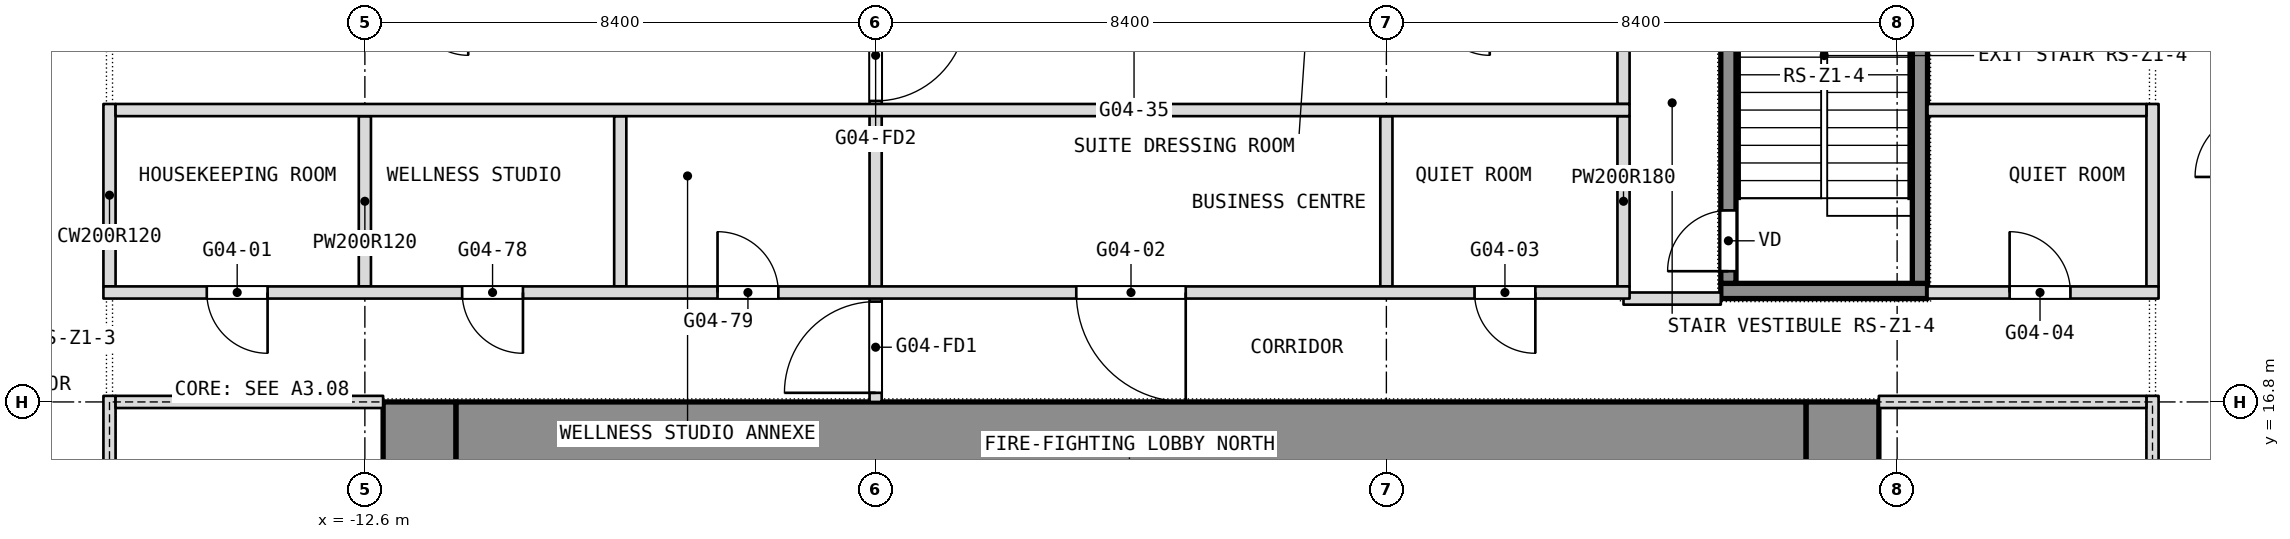
"""IFC4 building model, lengths in metres.
Left out: names, types, materials, properties, quantities, classifications, styles, units other than length and angle.
Written with IfcOpenShell. Run it as: python <this file> out.ifc"""

import sys

from ifc_helpers import new_model, si_unit, direction, frame, frame_2d, origin, place, context, subcontext, project, spatial, rectangle, extrude, element, fill, save


model = new_model("IFC4")
c1 = context("Model", 3, precision=1e-05, world=origin(), true_north=direction((0.0, 1.0)))
c2 = subcontext(c1, "Body", "Model", "MODEL_VIEW")
j1 = project(units=[si_unit("LENGTHUNIT", "METRE"), si_unit("PLANEANGLEUNIT", "RADIAN")], contexts=[c1])
p1 = place(None, origin())
s1 = spatial("IfcSite", under=j1, at=p1, CompositionType="ELEMENT")
p2 = place(p1, origin())
s2 = spatial("IfcBuilding", under=s1, at=p2, CompositionType="ELEMENT")
p3 = place(p2, frame((0.0, 0.0, 58.1)))
s3 = spatial("IfcBuildingStorey", under=s2, at=p3, CompositionType="ELEMENT", Elevation=58.1)
p4 = place(p3, frame((11.7, 0.0, 0.0), z_axis=(0.0, 0.0, 1.0), x_axis=(0.0, 1.0, 0.0)))
e1 = element("IfcWall", 1, at=p4, inside=s3, PredefinedType="SHEAR", context=c2, shape_type="SweptSolid", body=[
    extrude(rectangle(XDim=16.8, YDim=1.2, at=frame_2d((8.4, 0.0))), origin(), (0.0, 0.0, 1.0), 3.6),
])
p5 = place(p4, frame((1.762, 0.0, 0.0)))
e2 = element("IfcOpeningElement", 2, at=p5, cuts=e1, PredefinedType="OPENING", context=c2, shape_type="SweptSolid", body=[
    extrude(rectangle(XDim=0.9, YDim=2.1, at=frame_2d((0.45, 1.05))), frame((0.0, 0.6, 0.0), z_axis=(0.0, -1.0, 0.0), x_axis=(1.0, 0.0, 0.0)), (0.0, 0.0, 1.0), 1.2),
])
p6 = place(p4, frame((4.387, 0.0, 0.0)))
e3 = element("IfcOpeningElement", 3, at=p6, cuts=e1, PredefinedType="OPENING", context=c2, shape_type="SweptSolid", body=[
    extrude(rectangle(XDim=0.9, YDim=2.1, at=frame_2d((0.45, 1.05))), frame((0.0, 0.6, 0.0), z_axis=(0.0, -1.0, 0.0), x_axis=(1.0, 0.0, 0.0)), (0.0, 0.0, 1.0), 1.2),
])
p7 = place(p4, frame((6.825, 0.0, 0.0)))
e4 = element("IfcOpeningElement", 4, at=p7, cuts=e1, PredefinedType="OPENING", context=c2, shape_type="SweptSolid", body=[
    extrude(rectangle(XDim=1.2, YDim=2.1, at=frame_2d((0.6, 1.05))), frame((0.0, 0.6, 0.0), z_axis=(0.0, -1.0, 0.0), x_axis=(1.0, 0.0, 0.0)), (0.0, 0.0, 1.0), 1.2),
])
p8 = place(p4, frame((14.137, 0.0, 0.0)))
e5 = element("IfcOpeningElement", 5, at=p8, cuts=e1, PredefinedType="OPENING", context=c2, shape_type="SweptSolid", body=[
    extrude(rectangle(XDim=0.9, YDim=2.1, at=frame_2d((0.45, 1.05))), frame((0.0, 0.6, 0.0), z_axis=(0.0, -1.0, 0.0), x_axis=(1.0, 0.0, 0.0)), (0.0, 0.0, 1.0), 1.2),
])
p9 = place(p4, frame((11.512, 0.0, 0.0)))
e6 = element("IfcOpeningElement", 6, at=p9, cuts=e1, PredefinedType="OPENING", context=c2, shape_type="SweptSolid", body=[
    extrude(rectangle(XDim=0.9, YDim=2.1, at=frame_2d((0.45, 1.05))), frame((0.0, 0.6, 0.0), z_axis=(0.0, -1.0, 0.0), x_axis=(1.0, 0.0, 0.0)), (0.0, 0.0, 1.0), 1.2),
])
p10 = place(p4, frame((8.775, 0.0, 0.0)))
e7 = element("IfcOpeningElement", 7, at=p10, cuts=e1, PredefinedType="OPENING", context=c2, shape_type="SweptSolid", body=[
    extrude(rectangle(XDim=1.2, YDim=2.1, at=frame_2d((0.6, 1.05))), frame((0.0, 0.6, 0.0), z_axis=(0.0, -1.0, 0.0), x_axis=(1.0, 0.0, 0.0)), (0.0, 0.0, 1.0), 1.2),
])
p11 = place(p3, frame((-11.7, 0.0, 0.0), z_axis=(0.0, 0.0, 1.0), x_axis=(0.0, 1.0, 0.0)))
e8 = element("IfcWall", 8, at=p11, inside=s3, PredefinedType="SHEAR", context=c2, shape_type="SweptSolid", body=[
    extrude(rectangle(XDim=16.8, YDim=1.2, at=frame_2d((8.4, 0.0))), origin(), (0.0, 0.0, 1.0), 3.6),
])
p12 = place(p11, frame((2.3, 0.0, 0.0)))
e9 = element("IfcOpeningElement", 9, at=p12, cuts=e8, PredefinedType="OPENING", context=c2, shape_type="SweptSolid", body=[
    extrude(rectangle(XDim=1.1, YDim=2.1, at=frame_2d((0.55, 1.05))), frame((0.0, 0.6, 0.0), z_axis=(0.0, -1.0, 0.0), x_axis=(1.0, 0.0, 0.0)), (0.0, 0.0, 1.0), 1.2),
])
p13 = place(p11, frame((4.85, 0.0, 0.0)))
e10 = element("IfcOpeningElement", 10, at=p13, cuts=e8, PredefinedType="OPENING", context=c2, shape_type="SweptSolid", body=[
    extrude(rectangle(XDim=1.1, YDim=2.1, at=frame_2d((0.55, 1.05))), frame((0.0, 0.6, 0.0), z_axis=(0.0, -1.0, 0.0), x_axis=(1.0, 0.0, 0.0)), (0.0, 0.0, 1.0), 1.2),
])
p14 = place(p11, frame((6.825, 0.0, 0.0)))
e11 = element("IfcOpeningElement", 11, at=p14, cuts=e8, PredefinedType="OPENING", context=c2, shape_type="SweptSolid", body=[
    extrude(rectangle(XDim=1.2, YDim=2.1, at=frame_2d((0.6, 1.05))), frame((0.0, 0.6, 0.0), z_axis=(0.0, -1.0, 0.0), x_axis=(1.0, 0.0, 0.0)), (0.0, 0.0, 1.0), 1.2),
])
p15 = place(p11, frame((13.4, 0.0, 0.0)))
e12 = element("IfcOpeningElement", 12, at=p15, cuts=e8, PredefinedType="OPENING", context=c2, shape_type="SweptSolid", body=[
    extrude(rectangle(XDim=1.1, YDim=2.1, at=frame_2d((0.55, 1.05))), frame((0.0, 0.6, 0.0), z_axis=(0.0, -1.0, 0.0), x_axis=(1.0, 0.0, 0.0)), (0.0, 0.0, 1.0), 1.2),
])
p16 = place(p11, frame((10.85, 0.0, 0.0)))
e13 = element("IfcOpeningElement", 13, at=p16, cuts=e8, PredefinedType="OPENING", context=c2, shape_type="SweptSolid", body=[
    extrude(rectangle(XDim=1.1, YDim=2.1, at=frame_2d((0.55, 1.05))), frame((0.0, 0.6, 0.0), z_axis=(0.0, -1.0, 0.0), x_axis=(1.0, 0.0, 0.0)), (0.0, 0.0, 1.0), 1.2),
])
p17 = place(p11, frame((8.775, 0.0, 0.0)))
e14 = element("IfcOpeningElement", 14, at=p17, cuts=e8, PredefinedType="OPENING", context=c2, shape_type="SweptSolid", body=[
    extrude(rectangle(XDim=1.2, YDim=2.1, at=frame_2d((0.6, 1.05))), frame((0.0, 0.6, 0.0), z_axis=(0.0, -1.0, 0.0), x_axis=(1.0, 0.0, 0.0)), (0.0, 0.0, 1.0), 1.2),
])
p18 = place(p3, frame((-11.1, 16.2, 0.0), z_axis=(0.0, 0.0, 1.0), x_axis=(1.0, 0.0, 0.0)))
e15 = element("IfcWall", 15, at=p18, inside=s3, PredefinedType="SHEAR", context=c2, shape_type="SweptSolid", body=[
    extrude(rectangle(XDim=22.2, YDim=1.2, at=frame_2d((11.1, 0.0))), origin(), (0.0, 0.0, 1.0), 3.6),
])
p19 = place(p3, frame((16.8, 18.7, 0.0), z_axis=(0.0, 0.0, 1.0), x_axis=(0.0, 1.0, 0.0)))
e16 = element("IfcWall", 16, at=p19, inside=s3, PredefinedType="PARTITIONING", context=c2, shape_type="SweptSolid", body=[
    extrude(rectangle(XDim=3.0, YDim=0.2, at=frame_2d((1.5, 0.0))), origin(), (0.0, 0.0, 1.0), 3.34),
])
p20 = place(p3, frame((8.1, 18.7, 0.0), z_axis=(0.0, 0.0, 1.0), x_axis=(0.0, 1.0, 0.0)))
e17 = element("IfcWall", 17, at=p20, inside=s3, PredefinedType="PARTITIONING", context=c2, shape_type="SweptSolid", body=[
    extrude(rectangle(XDim=2.8, YDim=0.2, at=frame_2d((1.4, 0.0))), origin(), (0.0, 0.0, 1.0), 3.34),
])
p21 = place(p3, frame((8.1, 21.7, 0.0), z_axis=(0.0, 0.0, 1.0), x_axis=(0.0, 1.0, 0.0)))
e18 = element("IfcWall", 18, at=p21, inside=s3, PredefinedType="PARTITIONING", context=c2, shape_type="SweptSolid", body=[
    extrude(rectangle(XDim=2.9, YDim=0.2, at=frame_2d((1.45, 0.0))), origin(), (0.0, 0.0, 1.0), 3.34),
])
p22 = place(p21, frame((1.85, 0.0, 0.0)))
e19 = element("IfcOpeningElement", 19, at=p22, cuts=e18, PredefinedType="OPENING", context=c2, shape_type="SweptSolid", body=[
    extrude(rectangle(XDim=0.9, YDim=2.1, at=frame_2d((0.45, 1.05))), frame((0.0, 0.1, 0.0), z_axis=(0.0, -1.0, 0.0), x_axis=(1.0, 0.0, 0.0)), (0.0, 0.0, 1.0), 0.2),
])
p23 = place(p3, frame((4.2, 18.7, 0.0), z_axis=(0.0, 0.0, 1.0), x_axis=(0.0, 1.0, 0.0)))
e20 = element("IfcWall", 20, at=p23, inside=s3, PredefinedType="PARTITIONING", context=c2, shape_type="SweptSolid", body=[
    extrude(rectangle(XDim=2.8, YDim=0.2, at=frame_2d((1.4, 0.0))), origin(), (0.0, 0.0, 1.0), 3.34),
])
p24 = place(p3, frame((-4.2, 16.8, 0.0), z_axis=(0.0, 0.0, 1.0), x_axis=(0.0, 1.0, 0.0)))
e21 = element("IfcWall", 21, at=p24, inside=s3, PredefinedType="PARTITIONING", context=c2, shape_type="SweptSolid", body=[
    extrude(rectangle(XDim=6.7, YDim=0.2, at=frame_2d((3.35, 0.0))), origin(), (0.0, 0.0, 1.0), 3.34),
])
p25 = place(p24, frame((0.15, 0.0, 0.0)))
e22 = element("IfcOpeningElement", 22, at=p25, cuts=e21, PredefinedType="OPENING", context=c2, shape_type="SweptSolid", body=[
    extrude(rectangle(XDim=1.5, YDim=2.1, at=frame_2d((0.75, 1.05))), frame((0.0, 0.1, 0.0), z_axis=(0.0, -1.0, 0.0), x_axis=(1.0, 0.0, 0.0)), (0.0, 0.0, 1.0), 0.2),
])
p26 = place(p24, frame((4.95, 0.0, 0.0)))
e23 = element("IfcOpeningElement", 23, at=p26, cuts=e21, PredefinedType="OPENING", context=c2, shape_type="SweptSolid", body=[
    extrude(rectangle(XDim=1.5, YDim=2.1, at=frame_2d((0.75, 1.05))), frame((0.0, 0.1, 0.0), z_axis=(0.0, -1.0, 0.0), x_axis=(1.0, 0.0, 0.0)), (0.0, 0.0, 1.0), 0.2),
])
for number, where, z_axis, x_axis in (
    (24, (-8.4, 18.7, 0.0), (0.0, 0.0, 1.0), (0.0, 1.0, 0.0)),
    (25, (-12.6, 18.7, 0.0), (0.0, 0.0, 1.0), (0.0, 1.0, 0.0)),
):
    element("IfcWall", number, at=place(p3, frame(where, z_axis=z_axis, x_axis=x_axis)), inside=s3, PredefinedType="PARTITIONING", context=c2, shape_type="SweptSolid", body=[
        extrude(rectangle(XDim=2.8, YDim=0.2, at=frame_2d((1.4, 0.0))), origin(), (0.0, 0.0, 1.0), 3.34),
    ])
p27 = place(p3, frame((-16.8, 18.7, 0.0), z_axis=(0.0, 0.0, 1.0), x_axis=(0.0, 1.0, 0.0)))
e26 = element("IfcWall", 26, at=p27, inside=s3, PredefinedType="PARTITIONING", context=c2, shape_type="SweptSolid", body=[
    extrude(rectangle(XDim=3.0, YDim=0.2, at=frame_2d((1.5, 0.0))), origin(), (0.0, 0.0, 1.0), 3.34),
])
p28 = place(p3, frame((8.1, 18.5, 0.0), z_axis=(0.0, 0.0, 1.0), x_axis=(1.0, 0.0, 0.0)))
e27 = element("IfcWall", 27, at=p28, inside=s3, PredefinedType="PARTITIONING", context=c2, shape_type="SweptSolid", body=[
    extrude(rectangle(XDim=1.6, YDim=0.2, at=frame_2d((0.8, 0.0))), origin(), (0.0, 0.0, 1.0), 3.34),
])
p29 = place(p3, frame((-16.9, 18.6, 0.0), z_axis=(0.0, 0.0, 1.0), x_axis=(1.0, 0.0, 0.0)))
e28 = element("IfcWall", 28, at=p29, inside=s3, PredefinedType="PARTITIONING", context=c2, shape_type="SweptSolid", body=[
    extrude(rectangle(XDim=25.1, YDim=0.2, at=frame_2d((12.55, 0.0))), origin(), (0.0, 0.0, 1.0), 3.34),
])
p30 = place(p29, frame((1.7, 0.0, 0.0)))
e29 = element("IfcOpeningElement", 29, at=p30, cuts=e28, PredefinedType="OPENING", context=c2, shape_type="SweptSolid", body=[
    extrude(rectangle(XDim=1.0, YDim=2.1, at=frame_2d((0.5, 1.05))), frame((0.0, 0.1, 0.0), z_axis=(0.0, -1.0, 0.0), x_axis=(1.0, 0.0, 0.0)), (0.0, 0.0, 1.0), 0.2),
])
p31 = place(p29, frame((16.0, 0.0, 0.0)))
e30 = element("IfcOpeningElement", 30, at=p31, cuts=e28, PredefinedType="OPENING", context=c2, shape_type="SweptSolid", body=[
    extrude(rectangle(XDim=1.8, YDim=2.1, at=frame_2d((0.9, 1.05))), frame((0.0, 0.1, 0.0), z_axis=(0.0, -1.0, 0.0), x_axis=(1.0, 0.0, 0.0)), (0.0, 0.0, 1.0), 0.2),
])
p32 = place(p29, frame((22.55, 0.0, 0.0)))
e31 = element("IfcOpeningElement", 31, at=p32, cuts=e28, PredefinedType="OPENING", context=c2, shape_type="SweptSolid", body=[
    extrude(rectangle(XDim=1.0, YDim=2.1, at=frame_2d((0.5, 1.05))), frame((0.0, 0.1, 0.0), z_axis=(0.0, -1.0, 0.0), x_axis=(1.0, 0.0, 0.0)), (0.0, 0.0, 1.0), 0.2),
])
p33 = place(p29, frame((5.9, 0.0, 0.0)))
e32 = element("IfcOpeningElement", 32, at=p33, cuts=e28, PredefinedType="OPENING", context=c2, shape_type="SweptSolid", body=[
    extrude(rectangle(XDim=1.0, YDim=2.1, at=frame_2d((0.5, 1.05))), frame((0.0, 0.1, 0.0), z_axis=(0.0, -1.0, 0.0), x_axis=(1.0, 0.0, 0.0)), (0.0, 0.0, 1.0), 0.2),
])
p34 = place(p29, frame((10.1, 0.0, 0.0)))
e33 = element("IfcOpeningElement", 33, at=p34, cuts=e28, PredefinedType="OPENING", context=c2, shape_type="SweptSolid", body=[
    extrude(rectangle(XDim=1.0, YDim=2.1, at=frame_2d((0.5, 1.05))), frame((0.0, 0.1, 0.0), z_axis=(0.0, -1.0, 0.0), x_axis=(1.0, 0.0, 0.0)), (0.0, 0.0, 1.0), 0.2),
])
p35 = place(p3, frame((13.1, 18.6, 0.0), z_axis=(0.0, 0.0, 1.0), x_axis=(1.0, 0.0, 0.0)))
e34 = element("IfcWall", 34, at=p35, inside=s3, PredefinedType="PARTITIONING", context=c2, shape_type="SweptSolid", body=[
    extrude(rectangle(XDim=3.8, YDim=0.2, at=frame_2d((1.9, 0.0))), origin(), (0.0, 0.0, 1.0), 3.34),
])
p36 = place(p35, frame((1.35, 0.0, 0.0)))
e35 = element("IfcOpeningElement", 35, at=p36, cuts=e34, PredefinedType="OPENING", context=c2, shape_type="SweptSolid", body=[
    extrude(rectangle(XDim=1.0, YDim=2.1, at=frame_2d((0.5, 1.05))), frame((0.0, 0.1, 0.0), z_axis=(0.0, -1.0, 0.0), x_axis=(1.0, 0.0, 0.0)), (0.0, 0.0, 1.0), 0.2),
])
p37 = place(p3, frame((-16.7, 21.6, 0.0), z_axis=(0.0, 0.0, 1.0), x_axis=(1.0, 0.0, 0.0)))
e36 = element("IfcWall", 36, at=p37, inside=s3, PredefinedType="PARTITIONING", context=c2, shape_type="SweptSolid", body=[
    extrude(rectangle(XDim=24.9, YDim=0.2, at=frame_2d((12.45, 0.0))), origin(), (0.0, 0.0, 1.0), 3.34),
])
p38 = place(p3, frame((13.1, 21.6, 0.0), z_axis=(0.0, 0.0, 1.0), x_axis=(1.0, 0.0, 0.0)))
e37 = element("IfcWall", 37, at=p38, inside=s3, PredefinedType="PARTITIONING", context=c2, shape_type="SweptSolid", body=[
    extrude(rectangle(XDim=3.6, YDim=0.2, at=frame_2d((1.8, 0.0))), origin(), (0.0, 0.0, 1.0), 3.34),
])
p39 = place(p3, frame((-16.8, -0.1, 0.0), z_axis=(0.0, 0.0, 1.0), x_axis=(0.0, 1.0, 0.0)))
e38 = element("IfcWall", 38, at=p39, inside=s3, PredefinedType="PARTITIONING", context=c2, shape_type="SweptSolid", body=[
    extrude(rectangle(XDim=17.0, YDim=0.2, at=frame_2d((8.5, 0.0))), origin(), (0.0, 0.0, 1.0), 3.34),
])
p40 = place(p39, frame((2.2, 0.0, 0.0)))
e39 = element("IfcOpeningElement", 39, at=p40, cuts=e38, PredefinedType="OPENING", context=c2, shape_type="SweptSolid", body=[
    extrude(rectangle(XDim=1.8, YDim=2.1, at=frame_2d((0.9, 1.05))), frame((0.0, 0.1, 0.0), z_axis=(0.0, -1.0, 0.0), x_axis=(1.0, 0.0, 0.0)), (0.0, 0.0, 1.0), 0.2),
])
p41 = place(p39, frame((7.2, 0.0, 0.0)))
e40 = element("IfcOpeningElement", 40, at=p41, cuts=e38, PredefinedType="OPENING", context=c2, shape_type="SweptSolid", body=[
    extrude(rectangle(XDim=1.8, YDim=2.1, at=frame_2d((0.9, 1.05))), frame((0.0, 0.1, 0.0), z_axis=(0.0, -1.0, 0.0), x_axis=(1.0, 0.0, 0.0)), (0.0, 0.0, 1.0), 0.2),
])
p42 = place(p3, frame((-16.7, 16.8, 0.0), z_axis=(0.0, 0.0, 1.0), x_axis=(1.0, 0.0, 0.0)))
e41 = element("IfcWall", 41, at=p42, inside=s3, PredefinedType="PARTITIONING", context=c2, shape_type="SweptSolid", body=[
    extrude(rectangle(XDim=4.4, YDim=0.2, at=frame_2d((2.2, 0.0))), origin(), (0.0, 0.0, 1.0), 2.84),
])
p43 = place(p3, frame((16.8, -0.1, 0.0), z_axis=(0.0, 0.0, 1.0), x_axis=(0.0, 1.0, 0.0)))
e42 = element("IfcWall", 42, at=p43, inside=s3, PredefinedType="PARTITIONING", context=c2, shape_type="SweptSolid", body=[
    extrude(rectangle(XDim=17.0, YDim=0.2, at=frame_2d((8.5, 0.0))), origin(), (0.0, 0.0, 1.0), 3.34),
])
p44 = place(p43, frame((2.2, 0.0, 0.0)))
e43 = element("IfcOpeningElement", 43, at=p44, cuts=e42, PredefinedType="OPENING", context=c2, shape_type="SweptSolid", body=[
    extrude(rectangle(XDim=1.8, YDim=2.1, at=frame_2d((0.9, 1.05))), frame((0.0, 0.1, 0.0), z_axis=(0.0, -1.0, 0.0), x_axis=(1.0, 0.0, 0.0)), (0.0, 0.0, 1.0), 0.2),
])
p45 = place(p43, frame((13.0, 0.0, 0.0)))
e44 = element("IfcOpeningElement", 44, at=p45, cuts=e42, PredefinedType="OPENING", context=c2, shape_type="SweptSolid", body=[
    extrude(rectangle(XDim=1.8, YDim=2.1, at=frame_2d((0.9, 1.05))), frame((0.0, 0.1, 0.0), z_axis=(0.0, -1.0, 0.0), x_axis=(1.0, 0.0, 0.0)), (0.0, 0.0, 1.0), 0.2),
])
p46 = place(p3, frame((12.3, 16.8, 0.0), z_axis=(0.0, 0.0, 1.0), x_axis=(1.0, 0.0, 0.0)))
e45 = element("IfcWall", 45, at=p46, inside=s3, PredefinedType="PARTITIONING", context=c2, shape_type="SweptSolid", body=[
    extrude(rectangle(XDim=4.4, YDim=0.2, at=frame_2d((2.2, 0.0))), origin(), (0.0, 0.0, 1.0), 2.84),
])
p47 = place(p3, frame((9.7, 18.625, 0.1), z_axis=(0.0, 0.0, 1.0), x_axis=(1.0, 0.0, 0.0)))
e46 = element("IfcWall", 46, at=p47, inside=s3, PredefinedType="SHEAR", context=c2, shape_type="SweptSolid", body=[
    extrude(rectangle(XDim=3.4, YDim=0.25, at=frame_2d((1.7, 0.0))), origin(), (0.0, 0.0, 1.0), 3.6),
])
p48 = place(p3, frame((9.825, 18.75, 0.1), z_axis=(0.0, 0.0, 1.0), x_axis=(0.0, 1.0, 0.0)))
e47 = element("IfcWall", 47, at=p48, inside=s3, PredefinedType="SHEAR", context=c2, shape_type="SweptSolid", body=[
    extrude(rectangle(XDim=5.7, YDim=0.25, at=frame_2d((2.85, 0.0))), origin(), (0.0, 0.0, 1.0), 3.6),
])
p49 = place(p48, frame((0.2, 0.0, 0.0)))
e48 = element("IfcOpeningElement", 48, at=p49, cuts=e47, PredefinedType="OPENING", context=c2, shape_type="SweptSolid", body=[
    extrude(rectangle(XDim=1.0, YDim=2.1, at=frame_2d((0.5, 1.05))), frame((0.0, 0.125, 0.0), z_axis=(0.0, -1.0, 0.0), x_axis=(1.0, 0.0, 0.0)), (0.0, 0.0, 1.0), 0.25),
])
p50 = place(p3, frame((12.975, 18.75, 0.1), z_axis=(0.0, 0.0, 1.0), x_axis=(0.0, 1.0, 0.0)))
e49 = element("IfcWall", 49, at=p50, inside=s3, PredefinedType="SHEAR", context=c2, shape_type="SweptSolid", body=[
    extrude(rectangle(XDim=5.7, YDim=0.25, at=frame_2d((2.85, 0.0))), origin(), (0.0, 0.0, 1.0), 3.6),
])
p51 = place(p30, origin())
e50 = element("IfcDoor", 50, at=p51, inside=s3, OperationType="SINGLE_SWING_RIGHT", PredefinedType="DOOR", context=c2, shape_type="SweptSolid", body=[
    extrude(rectangle(XDim=1.0, YDim=2.1, at=frame_2d((0.5, 1.05))), frame((0.0, 0.025, 0.0), z_axis=(0.0, -1.0, 0.0), x_axis=(1.0, 0.0, 0.0)), (0.0, 0.0, 1.0), 0.05),
])
fill(e29, e50)
p52 = place(p31, origin())
e51 = element("IfcDoor", 51, at=p52, inside=s3, OperationType="DOUBLE_DOOR_SINGLE_SWING", PredefinedType="DOOR", context=c2, shape_type="SweptSolid", body=[
    extrude(rectangle(XDim=1.8, YDim=2.1, at=frame_2d((0.9, 1.05))), frame((0.0, 0.025, 0.0), z_axis=(0.0, -1.0, 0.0), x_axis=(1.0, 0.0, 0.0)), (0.0, 0.0, 1.0), 0.05),
])
fill(e30, e51)
p53 = place(p32, origin())
e52 = element("IfcDoor", 52, at=p53, inside=s3, OperationType="SINGLE_SWING_LEFT", PredefinedType="DOOR", context=c2, shape_type="SweptSolid", body=[
    extrude(rectangle(XDim=1.0, YDim=2.1, at=frame_2d((0.5, 1.05))), frame((0.0, 0.025, 0.0), z_axis=(0.0, -1.0, 0.0), x_axis=(1.0, 0.0, 0.0)), (0.0, 0.0, 1.0), 0.05),
])
fill(e31, e52)
p54 = place(p33, origin())
e53 = element("IfcDoor", 53, at=p54, inside=s3, OperationType="SINGLE_SWING_RIGHT", PredefinedType="DOOR", context=c2, shape_type="SweptSolid", body=[
    extrude(rectangle(XDim=1.0, YDim=2.1, at=frame_2d((0.5, 1.05))), frame((0.0, 0.025, 0.0), z_axis=(0.0, -1.0, 0.0), x_axis=(1.0, 0.0, 0.0)), (0.0, 0.0, 1.0), 0.05),
])
fill(e32, e53)
p55 = place(p34, origin())
e54 = element("IfcDoor", 54, at=p55, inside=s3, OperationType="SINGLE_SWING_LEFT", PredefinedType="DOOR", context=c2, shape_type="SweptSolid", body=[
    extrude(rectangle(XDim=1.0, YDim=2.1, at=frame_2d((0.5, 1.05))), frame((0.0, 0.025, 0.0), z_axis=(0.0, -1.0, 0.0), x_axis=(1.0, 0.0, 0.0)), (0.0, 0.0, 1.0), 0.05),
])
fill(e33, e54)
p56 = place(p36, origin())
e55 = element("IfcDoor", 55, at=p56, inside=s3, OperationType="SINGLE_SWING_LEFT", PredefinedType="DOOR", context=c2, shape_type="SweptSolid", body=[
    extrude(rectangle(XDim=1.0, YDim=2.1, at=frame_2d((0.5, 1.05))), frame((0.0, 0.025, 0.0), z_axis=(0.0, -1.0, 0.0), x_axis=(1.0, 0.0, 0.0)), (0.0, 0.0, 1.0), 0.05),
])
fill(e35, e55)
p57 = place(p49, origin())
e56 = element("IfcDoor", 56, at=p57, inside=s3, OperationType="SINGLE_SWING_LEFT", PredefinedType="DOOR", context=c2, shape_type="SweptSolid", body=[
    extrude(rectangle(XDim=1.0, YDim=2.1, at=frame_2d((0.5, 1.05))), frame((0.0, 0.025, 0.0), z_axis=(0.0, -1.0, 0.0), x_axis=(1.0, 0.0, 0.0)), (0.0, 0.0, 1.0), 0.05),
])
fill(e48, e56)
p58 = place(p25, origin())
e57 = element("IfcDoor", 57, at=p58, inside=s3, OperationType="DOUBLE_DOOR_DOUBLE_SWING", PredefinedType="DOOR", context=c2, shape_type="SweptSolid", body=[
    extrude(rectangle(XDim=1.5, YDim=2.1, at=frame_2d((0.75, 1.05))), frame((0.0, 0.025, 0.0), z_axis=(0.0, -1.0, 0.0), x_axis=(1.0, 0.0, 0.0)), (0.0, 0.0, 1.0), 0.05),
])
fill(e22, e57)
p59 = place(p26, origin())
e58 = element("IfcDoor", 58, at=p59, inside=s3, OperationType="DOUBLE_DOOR_DOUBLE_SWING", PredefinedType="DOOR", context=c2, shape_type="SweptSolid", body=[
    extrude(rectangle(XDim=1.5, YDim=2.1, at=frame_2d((0.75, 1.05))), frame((0.0, 0.025, 0.0), z_axis=(0.0, -1.0, 0.0), x_axis=(1.0, 0.0, 0.0)), (0.0, 0.0, 1.0), 0.05),
])
fill(e23, e58)
save(model, sys.argv[1])
